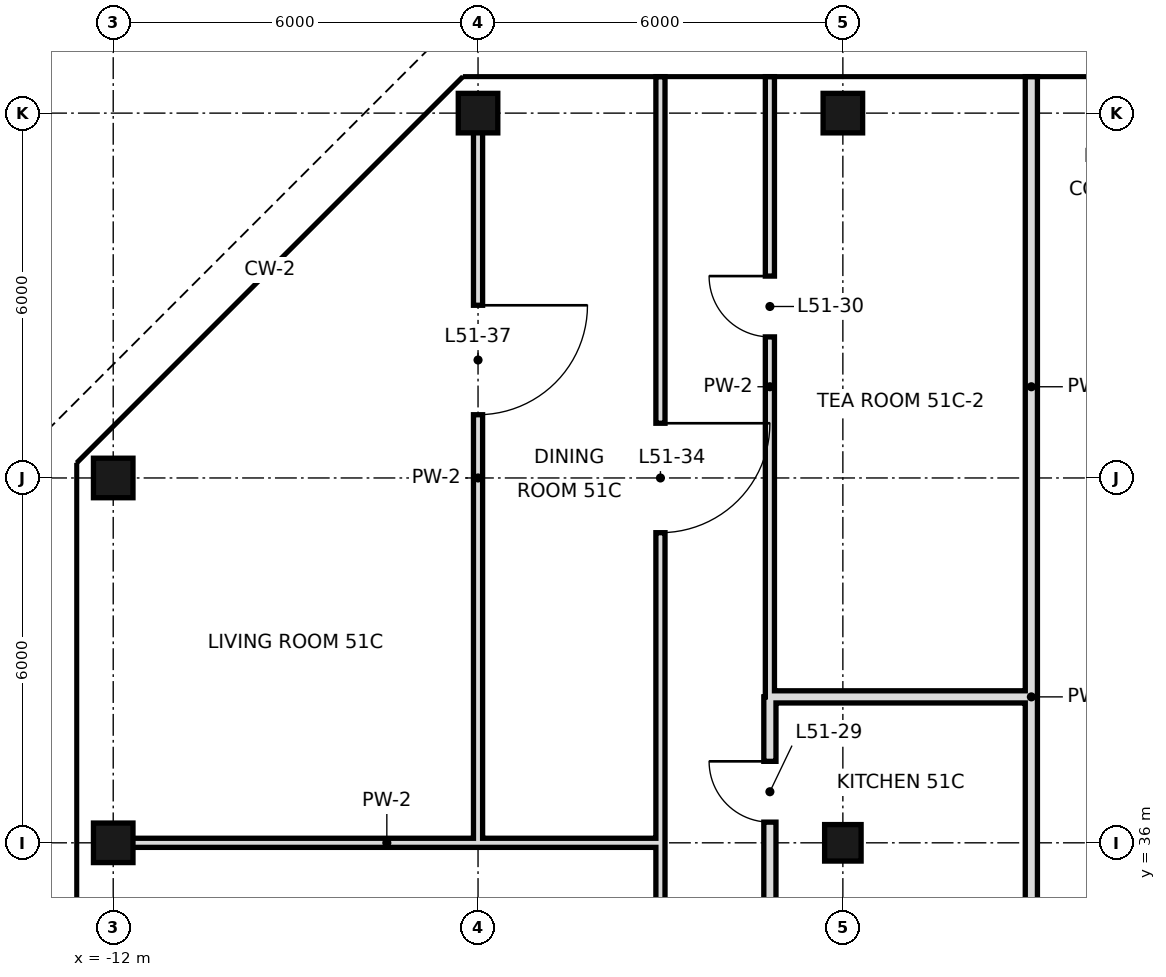
"""IFC4 building model, lengths in metres.
Left out: names, types, materials, properties, quantities, classifications, styles, units other than length and angle.
Written with IfcOpenShell. Run it as: python <this file> out.ifc"""

import sys

from ifc_helpers import new_model, si_unit, direction, frame, frame_2d, origin, origin_2d, place, context, subcontext, project, spatial, rectangle, hollow_rectangle, extrude, element, fill, save


model = new_model("IFC4")
c1 = context("Model", 3, precision=1e-05, world=origin(), true_north=direction((0.0, 1.0)))
c2 = subcontext(c1, "Body", "Model", "MODEL_VIEW")
j1 = project(units=[si_unit("LENGTHUNIT", "METRE"), si_unit("PLANEANGLEUNIT", "RADIAN")], contexts=[c1])
p1 = place(None, origin())
s1 = spatial("IfcSite", under=j1, at=p1, CompositionType="ELEMENT")
p2 = place(p1, origin())
s2 = spatial("IfcBuilding", under=s1, at=p2, CompositionType="ELEMENT")
p3 = place(p2, frame((0.0, 0.0, 219.0)))
s3 = spatial("IfcBuildingStorey", under=s2, at=p3, CompositionType="ELEMENT", Elevation=219.0)
for number, where, z_axis, x_axis in (
    (1, (-12.0, 36.0, 0.0), (0.0, 0.0, 1.0), (1.0, 0.0, 0.0)),
    (2, (-12.0, 42.0, 0.0), (0.0, 0.0, 1.0), (1.0, 0.0, 0.0)),
    (3, (-6.0, 48.0, 0.0), (0.0, 0.0, 1.0), (1.0, 0.0, 0.0)),
):
    element("IfcColumn", number, at=place(p3, frame(where, z_axis=z_axis, x_axis=x_axis)), inside=s3, PredefinedType="COLUMN", context=c2, shape_type="SweptSolid", body=[
        extrude(hollow_rectangle(XDim=0.65, YDim=0.65, WallThickness=0.032, at=origin_2d()), origin(), (0.0, 0.0, 1.0), 3.6),
    ])
p4 = place(p3, frame((0.0, 36.0, 0.0), z_axis=(0.0, 0.0, 1.0), x_axis=(1.0, 0.0, 0.0)))
e4 = element("IfcColumn", 4, at=p4, inside=s3, PredefinedType="COLUMN", context=c2, shape_type="SweptSolid", body=[
    extrude(hollow_rectangle(XDim=0.6, YDim=0.6, WallThickness=0.028, at=origin_2d()), origin(), (0.0, 0.0, 1.0), 3.6),
])
p5 = place(p3, frame((0.0, 48.0, 0.0), z_axis=(0.0, 0.0, 1.0), x_axis=(1.0, 0.0, 0.0)))
e5 = element("IfcColumn", 5, at=p5, inside=s3, PredefinedType="COLUMN", context=c2, shape_type="SweptSolid", body=[
    extrude(hollow_rectangle(XDim=0.65, YDim=0.65, WallThickness=0.032, at=origin_2d()), origin(), (0.0, 0.0, 1.0), 3.6),
])
p6 = place(p3, frame((-1.2, 34.2, 0.0), z_axis=(0.0, 0.0, 1.0), x_axis=(0.0, 1.0, 0.0)))
e6 = element("IfcWall", 6, at=p6, inside=s3, PredefinedType="SOLIDWALL", context=c2, shape_type="SweptSolid", body=[
    extrude(rectangle(XDim=4.2, YDim=0.2, at=frame_2d((2.1, 0.0))), origin(), (0.0, 0.0, 1.0), 2.72),
])
p7 = place(p6, frame((2.14, 0.0, 0.0)))
e7 = element("IfcOpeningElement", 7, at=p7, cuts=e6, PredefinedType="OPENING", context=c2, shape_type="SweptSolid", body=[
    extrude(rectangle(XDim=1.0, YDim=2.4, at=frame_2d((0.5, 1.2))), frame((0.0, 0.11, 0.0), z_axis=(0.0, -1.0, 0.0), x_axis=(1.0, 0.0, 0.0)), (0.0, 0.0, 1.0), 0.22),
])
p8 = place(p3, frame((-1.2, 38.4, 0.0), z_axis=(0.0, 0.0, 1.0), x_axis=(0.0, 1.0, 0.0)))
e8 = element("IfcWall", 8, at=p8, inside=s3, PredefinedType="PARTITIONING", context=c2, shape_type="SweptSolid", body=[
    extrude(rectangle(XDim=10.2, YDim=0.15, at=frame_2d((5.1, 0.0))), origin(), (0.0, 0.0, 1.0), 3.42),
])
p9 = place(p8, frame((5.92, 0.0, 0.0)))
e9 = element("IfcOpeningElement", 9, at=p9, cuts=e8, PredefinedType="OPENING", context=c2, shape_type="SweptSolid", body=[
    extrude(rectangle(XDim=1.0, YDim=2.4, at=frame_2d((0.5, 1.2))), frame((0.0, 0.085, 0.0), z_axis=(0.0, -1.0, 0.0), x_axis=(1.0, 0.0, 0.0)), (0.0, 0.0, 1.0), 0.17),
])
p10 = place(p3, frame((-3.0, 21.0, 0.0), z_axis=(0.0, 0.0, 1.0), x_axis=(0.0, 1.0, 0.0)))
e10 = element("IfcWall", 10, at=p10, inside=s3, PredefinedType="PARTITIONING", context=c2, shape_type="SweptSolid", body=[
    extrude(rectangle(XDim=27.6, YDim=0.15, at=frame_2d((13.8, 0.0))), origin(), (0.0, 0.0, 1.0), 3.42),
])
p11 = place(p10, frame((1.3, 0.0, 0.0)))
e11 = element("IfcOpeningElement", 11, at=p11, cuts=e10, PredefinedType="OPENING", context=c2, shape_type="SweptSolid", body=[
    extrude(rectangle(XDim=1.0, YDim=2.4, at=frame_2d((0.5, 1.2))), frame((0.0, 0.085, 0.0), z_axis=(0.0, -1.0, 0.0), x_axis=(1.0, 0.0, 0.0)), (0.0, 0.0, 1.0), 0.17),
])
p12 = place(p10, frame((6.4, 0.0, 0.0)))
e12 = element("IfcOpeningElement", 12, at=p12, cuts=e10, PredefinedType="OPENING", context=c2, shape_type="SweptSolid", body=[
    extrude(rectangle(XDim=1.0, YDim=2.4, at=frame_2d((0.5, 1.2))), frame((0.0, 0.085, 0.0), z_axis=(0.0, -1.0, 0.0), x_axis=(1.0, 0.0, 0.0)), (0.0, 0.0, 1.0), 0.17),
])
p13 = place(p10, frame((12.4, 0.0, 0.0)))
e13 = element("IfcOpeningElement", 13, at=p13, cuts=e10, PredefinedType="OPENING", context=c2, shape_type="SweptSolid", body=[
    extrude(rectangle(XDim=1.0, YDim=2.4, at=frame_2d((0.5, 1.2))), frame((0.0, 0.085, 0.0), z_axis=(0.0, -1.0, 0.0), x_axis=(1.0, 0.0, 0.0)), (0.0, 0.0, 1.0), 0.17),
])
p14 = place(p10, frame((20.1, 0.0, 0.0)))
e14 = element("IfcOpeningElement", 14, at=p14, cuts=e10, PredefinedType="OPENING", context=c2, shape_type="SweptSolid", body=[
    extrude(rectangle(XDim=1.8, YDim=2.4, at=frame_2d((0.9, 1.2))), frame((0.0, 0.085, 0.0), z_axis=(0.0, -1.0, 0.0), x_axis=(1.0, 0.0, 0.0)), (0.0, 0.0, 1.0), 0.17),
])
p15 = place(p3, frame((-6.0, 36.0, 0.0), z_axis=(0.0, 0.0, 1.0), x_axis=(0.0, 1.0, 0.0)))
e15 = element("IfcWall", 15, at=p15, inside=s3, PredefinedType="PARTITIONING", context=c2, shape_type="SweptSolid", body=[
    extrude(rectangle(XDim=12.0, YDim=0.15, at=frame_2d((6.0, 0.0))), origin(), (0.0, 0.0, 1.0), 3.42),
])
p16 = place(p15, frame((7.04, 0.0, 0.0)))
e16 = element("IfcOpeningElement", 16, at=p16, cuts=e15, PredefinedType="OPENING", context=c2, shape_type="SweptSolid", body=[
    extrude(rectangle(XDim=1.8, YDim=2.4, at=frame_2d((0.9, 1.2))), frame((0.0, 0.085, 0.0), z_axis=(0.0, -1.0, 0.0), x_axis=(1.0, 0.0, 0.0)), (0.0, 0.0, 1.0), 0.17),
])
p17 = place(p3, frame((3.1, 38.4, 0.0), z_axis=(0.0, 0.0, 1.0), x_axis=(0.0, 1.0, 0.0)))
e17 = element("IfcWall", 17, at=p17, inside=s3, PredefinedType="SOLIDWALL", context=c2, shape_type="SweptSolid", body=[
    extrude(rectangle(XDim=10.2, YDim=0.2, at=frame_2d((5.1, 0.0))), origin(), (0.0, 0.0, 1.0), 2.72),
])
p18 = place(p3, frame((3.1, 34.2, 0.0), z_axis=(0.0, 0.0, 1.0), x_axis=(0.0, 1.0, 0.0)))
e18 = element("IfcWall", 18, at=p18, inside=s3, PredefinedType="SOLIDWALL", context=c2, shape_type="SweptSolid", body=[
    extrude(rectangle(XDim=4.2, YDim=0.2, at=frame_2d((2.1, 0.0))), origin(), (0.0, 0.0, 1.0), 3.42),
])
p19 = place(p3, frame((-12.0, 36.0, 0.0), z_axis=(0.0, 0.0, 1.0), x_axis=(1.0, 0.0, 0.0)))
e19 = element("IfcWall", 19, at=p19, inside=s3, PredefinedType="PARTITIONING", context=c2, shape_type="SweptSolid", body=[
    extrude(rectangle(XDim=9.0, YDim=0.15, at=frame_2d((4.5, 0.0))), origin(), (0.0, 0.0, 1.0), 2.72),
])
p20 = place(p3, frame((-1.2, 38.4, 0.0), z_axis=(0.0, 0.0, 1.0), x_axis=(1.0, 0.0, 0.0)))
e20 = element("IfcWall", 20, at=p20, inside=s3, PredefinedType="SOLIDWALL", context=c2, shape_type="SweptSolid", body=[
    extrude(rectangle(XDim=4.3, YDim=0.2, at=frame_2d((2.15, 0.0))), origin(), (0.0, 0.0, 1.0), 2.72),
])
p21 = place(p7, frame((1.0, 0.0, 0.0), z_axis=(0.0, 0.0, 1.0), x_axis=(-1.0, 0.0, 0.0)))
e21 = element("IfcDoor", 21, at=p21, inside=s3, OperationType="SINGLE_SWING_LEFT", PredefinedType="DOOR", context=c2, shape_type="SweptSolid", body=[
    extrude(rectangle(XDim=1.0, YDim=2.4, at=frame_2d((0.5, 1.2))), frame((0.0, 0.025, 0.0), z_axis=(0.0, -1.0, 0.0), x_axis=(1.0, 0.0, 0.0)), (0.0, 0.0, 1.0), 0.05),
])
fill(e7, e21)
p22 = place(p9, frame((1.0, 0.0, 0.0), z_axis=(0.0, 0.0, 1.0), x_axis=(-1.0, 0.0, 0.0)))
e22 = element("IfcDoor", 22, at=p22, inside=s3, OperationType="SINGLE_SWING_LEFT", PredefinedType="DOOR", context=c2, shape_type="SweptSolid", body=[
    extrude(rectangle(XDim=1.0, YDim=2.4, at=frame_2d((0.5, 1.2))), frame((0.0, 0.025, 0.0), z_axis=(0.0, -1.0, 0.0), x_axis=(1.0, 0.0, 0.0)), (0.0, 0.0, 1.0), 0.05),
])
fill(e9, e22)
p23 = place(p14, origin())
e23 = element("IfcDoor", 23, at=p23, inside=s3, OperationType="SINGLE_SWING_RIGHT", PredefinedType="DOOR", context=c2, shape_type="SweptSolid", body=[
    extrude(rectangle(XDim=1.8, YDim=2.4, at=frame_2d((0.9, 1.2))), frame((0.0, 0.025, 0.0), z_axis=(0.0, -1.0, 0.0), x_axis=(1.0, 0.0, 0.0)), (0.0, 0.0, 1.0), 0.05),
])
fill(e14, e23)
p24 = place(p16, origin())
e24 = element("IfcDoor", 24, at=p24, inside=s3, OperationType="SINGLE_SWING_RIGHT", PredefinedType="DOOR", context=c2, shape_type="SweptSolid", body=[
    extrude(rectangle(XDim=1.8, YDim=2.4, at=frame_2d((0.9, 1.2))), frame((0.0, 0.025, 0.0), z_axis=(0.0, -1.0, 0.0), x_axis=(1.0, 0.0, 0.0)), (0.0, 0.0, 1.0), 0.05),
])
fill(e16, e24)
save(model, sys.argv[1])
